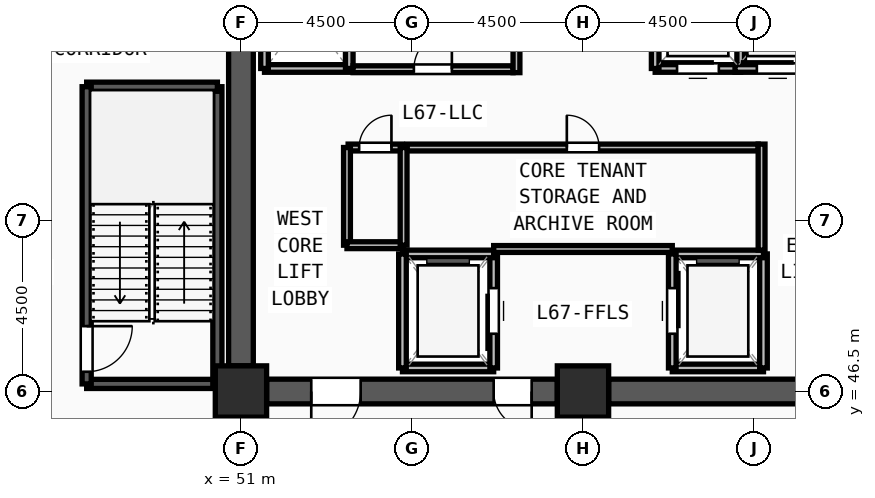
"""IFC4 building model, lengths in metres.
Left out: names, types, materials, properties, quantities, classifications, styles, units other than length and angle.
Written with IfcOpenShell. Run it as: python <this file> out.ifc"""

import sys

from ifc_helpers import new_model, si_unit, direction, frame, frame_2d, origin, origin_2d, place, context, subcontext, project, spatial, rectangle, extrude, source, transform, mapped, element, fill, save


model = new_model("IFC4")
c1 = context("Model", 3, precision=1e-05, world=origin(), true_north=direction((0.0, 1.0)))
c2 = subcontext(c1, "Body", "Model", "MODEL_VIEW")
j1 = project(units=[si_unit("LENGTHUNIT", "METRE"), si_unit("PLANEANGLEUNIT", "RADIAN")], contexts=[c1])
p1 = place(None, origin())
s1 = spatial("IfcSite", under=j1, at=p1, CompositionType="ELEMENT")
p2 = place(p1, origin())
s2 = spatial("IfcBuilding", under=s1, at=p2, CompositionType="ELEMENT")
p3 = place(p2, frame((0.0, 0.0, 258.75)))
s3 = spatial("IfcBuildingStorey", under=s2, at=p3, CompositionType="ELEMENT", Elevation=258.75)
m1 = source(origin(), c2, "Body", "SweptSolid", [
    extrude(rectangle(XDim=1.35, YDim=1.35, at=origin_2d()), origin(), (0.0, 0.0, 1.0), 3.75),
])
for number, where, z_axis, x_axis in (
    (1, (51.0, 46.5, 0.0), (0.0, 0.0, 1.0), (1.0, 0.0, 0.0)),
    (2, (60.0, 46.5, 0.0), (0.0, 0.0, 1.0), (1.0, 0.0, 0.0)),
):
    element("IfcColumn", number, at=place(p3, frame(where, z_axis=z_axis, x_axis=x_axis)), inside=s3, PredefinedType="COLUMN", context=c2, shape_type="MappedRepresentation", body=[
        mapped(m1, transform((0.0, 0.0, 0.0), x_axis=(1.0, 0.0, 0.0), y_axis=(0.0, 1.0, 0.0), z_axis=(0.0, 0.0, 1.0), scale=1.0)),
    ])
p4 = place(p3, frame((68.325, 46.5, 0.0), z_axis=(0.0, 0.0, 1.0), x_axis=(-1.0, 0.0, 0.0)))
e3 = element("IfcWall", 3, at=p4, inside=s3, PredefinedType="SHEAR", context=c2, shape_type="SweptSolid", body=[
    extrude(rectangle(XDim=7.65, YDim=0.65, at=frame_2d((3.825, 0.0))), origin(), (0.0, 0.0, 1.0), 3.57),
])
m2 = source(origin(), c2, "Body", "SweptSolid", [
    extrude(rectangle(XDim=1.3, YDim=2.2, at=frame_2d((0.65, 1.1))), frame((0.0, 0.335, 0.0), z_axis=(0.0, -1.0, 0.0), x_axis=(1.0, 0.0, 0.0)), (0.0, 0.0, 1.0), 0.67),
])
p5 = place(p4, frame((1.175, 0.0, 0.0)))
e4 = element("IfcOpeningElement", 4, at=p5, cuts=e3, PredefinedType="OPENING", context=c2, shape_type="MappedRepresentation", body=[
    mapped(m2, transform((0.0, 0.0, 0.0), x_axis=(1.0, 0.0, 0.0), y_axis=(0.0, 1.0, 0.0), z_axis=(0.0, 0.0, 1.0), scale=1.0)),
])
p6 = place(p3, frame((59.325, 46.5, 0.0), z_axis=(0.0, 0.0, 1.0), x_axis=(-1.0, 0.0, 0.0)))
e5 = element("IfcWall", 5, at=p6, inside=s3, PredefinedType="SHEAR", context=c2, shape_type="SweptSolid", body=[
    extrude(rectangle(XDim=7.65, YDim=0.65, at=frame_2d((3.825, 0.0))), origin(), (0.0, 0.0, 1.0), 3.57),
])
p7 = place(p6, frame((5.175, 0.0, 0.0)))
e6 = element("IfcOpeningElement", 6, at=p7, cuts=e5, PredefinedType="OPENING", context=c2, shape_type="MappedRepresentation", body=[
    mapped(m2, transform((0.0, 0.0, 0.0), x_axis=(1.0, 0.0, 0.0), y_axis=(0.0, 1.0, 0.0), z_axis=(0.0, 0.0, 1.0), scale=1.0)),
])
m3 = source(origin(), c2, "Body", "SweptSolid", [
    extrude(rectangle(XDim=1.0, YDim=2.2, at=frame_2d((0.5, 1.1))), frame((0.0, 0.335, 0.0), z_axis=(0.0, -1.0, 0.0), x_axis=(1.0, 0.0, 0.0)), (0.0, 0.0, 1.0), 0.67),
])
p8 = place(p6, frame((0.675, 0.0, 0.0)))
e7 = element("IfcOpeningElement", 7, at=p8, cuts=e5, PredefinedType="OPENING", context=c2, shape_type="MappedRepresentation", body=[
    mapped(m3, transform((0.0, 0.0, 0.0), x_axis=(1.0, 0.0, 0.0), y_axis=(0.0, 1.0, 0.0), z_axis=(0.0, 0.0, 1.0), scale=1.0)),
])
p9 = place(p3, frame((51.0, 47.175, 0.0), z_axis=(0.0, 0.0, 1.0), x_axis=(0.0, 1.0, 0.0)))
e8 = element("IfcWall", 8, at=p9, inside=s3, PredefinedType="SHEAR", context=c2, shape_type="SweptSolid", body=[
    extrude(rectangle(XDim=13.65, YDim=0.65, at=frame_2d((6.825, 0.0))), origin(), (0.0, 0.0, 1.0), 3.57),
])
p10 = place(p3, frame((46.94, 46.7, 0.0), z_axis=(0.0, 0.0, 1.0), x_axis=(1.0, 0.0, 0.0)))
e9 = element("IfcWall", 9, at=p10, inside=s3, PredefinedType="SOLIDWALL", context=c2, shape_type="SweptSolid", body=[
    extrude(rectangle(XDim=3.44, YDim=0.24, at=frame_2d((1.72, 0.0))), origin(), (0.0, 0.0, 1.0), 3.57),
])
p11 = place(p3, frame((50.38, 46.7, 0.0), z_axis=(0.0, 0.0, 1.0), x_axis=(0.0, 1.0, 0.0)))
e10 = element("IfcWall", 10, at=p11, inside=s3, PredefinedType="SOLIDWALL", context=c2, shape_type="SweptSolid", body=[
    extrude(rectangle(XDim=7.82, YDim=0.24, at=frame_2d((3.91, 0.0))), origin(), (0.0, 0.0, 1.0), 3.57),
])
p12 = place(p3, frame((50.38, 54.52, 0.0), z_axis=(0.0, 0.0, 1.0), x_axis=(-1.0, 0.0, 0.0)))
e11 = element("IfcWall", 11, at=p12, inside=s3, PredefinedType="SOLIDWALL", context=c2, shape_type="SweptSolid", body=[
    extrude(rectangle(XDim=3.44, YDim=0.24, at=frame_2d((1.72, 0.0))), origin(), (0.0, 0.0, 1.0), 3.57),
])
p13 = place(p3, frame((46.94, 54.52, 0.0), z_axis=(0.0, 0.0, 1.0), x_axis=(0.0, -1.0, 0.0)))
e12 = element("IfcWall", 12, at=p13, inside=s3, PredefinedType="SOLIDWALL", context=c2, shape_type="SweptSolid", body=[
    extrude(rectangle(XDim=7.82, YDim=0.24, at=frame_2d((3.91, 0.0))), origin(), (0.0, 0.0, 1.0), 3.57),
])
m4 = source(origin(), c2, "Body", "SweptSolid", [
    extrude(rectangle(XDim=1.2, YDim=2.2, at=frame_2d((0.6, 1.1))), frame((0.0, 0.13, 0.0), z_axis=(0.0, -1.0, 0.0), x_axis=(1.0, 0.0, 0.0)), (0.0, 0.0, 1.0), 0.26),
])
p14 = place(p13, frame((6.3, 0.0, 0.0)))
e13 = element("IfcOpeningElement", 13, at=p14, cuts=e12, PredefinedType="OPENING", context=c2, shape_type="MappedRepresentation", body=[
    mapped(m4, transform((0.0, 0.0, 0.0), x_axis=(1.0, 0.0, 0.0), y_axis=(0.0, 1.0, 0.0), z_axis=(0.0, 0.0, 1.0), scale=1.0)),
])
p15 = place(p3, frame((55.25, 47.12, 0.0), z_axis=(0.0, 0.0, 1.0), x_axis=(1.0, 0.0, 0.0)))
e14 = element("IfcWall", 14, at=p15, inside=s3, PredefinedType="SOLIDWALL", context=c2, shape_type="SweptSolid", body=[
    extrude(rectangle(XDim=2.4, YDim=0.2, at=frame_2d((1.2, 0.0))), origin(), (0.0, 0.0, 1.0), 3.57),
])
p16 = place(p3, frame((57.65, 47.12, 0.0), z_axis=(0.0, 0.0, 1.0), x_axis=(0.0, 1.0, 0.0)))
e15 = element("IfcWall", 15, at=p16, inside=s3, PredefinedType="SOLIDWALL", context=c2, shape_type="SweptSolid", body=[
    extrude(rectangle(XDim=3.0, YDim=0.2, at=frame_2d((1.5, 0.0))), origin(), (0.0, 0.0, 1.0), 3.57),
])
m5 = source(origin(), c2, "Body", "SweptSolid", [
    extrude(rectangle(XDim=1.2, YDim=2.3, at=frame_2d((0.6, 1.15))), frame((0.0, 0.11, 0.0), z_axis=(0.0, -1.0, 0.0), x_axis=(1.0, 0.0, 0.0)), (0.0, 0.0, 1.0), 0.22),
])
p17 = place(p16, frame((0.9, 0.0, 0.0)))
e16 = element("IfcOpeningElement", 16, at=p17, cuts=e15, PredefinedType="OPENING", context=c2, shape_type="MappedRepresentation", body=[
    mapped(m5, transform((0.0, 0.0, 0.0), x_axis=(1.0, 0.0, 0.0), y_axis=(0.0, 1.0, 0.0), z_axis=(0.0, 0.0, 1.0), scale=1.0)),
])
p18 = place(p3, frame((57.65, 50.12, 0.0), z_axis=(0.0, 0.0, 1.0), x_axis=(-1.0, 0.0, 0.0)))
e17 = element("IfcWall", 17, at=p18, inside=s3, PredefinedType="SOLIDWALL", context=c2, shape_type="SweptSolid", body=[
    extrude(rectangle(XDim=2.4, YDim=0.2, at=frame_2d((1.2, 0.0))), origin(), (0.0, 0.0, 1.0), 3.57),
])
p19 = place(p3, frame((55.25, 50.12, 0.0), z_axis=(0.0, 0.0, 1.0), x_axis=(0.0, -1.0, 0.0)))
e18 = element("IfcWall", 18, at=p19, inside=s3, PredefinedType="SOLIDWALL", context=c2, shape_type="SweptSolid", body=[
    extrude(rectangle(XDim=3.0, YDim=0.2, at=frame_2d((1.5, 0.0))), origin(), (0.0, 0.0, 1.0), 3.57),
])
p20 = place(p3, frame((62.35, 47.12, 0.0), z_axis=(0.0, 0.0, 1.0), x_axis=(1.0, 0.0, 0.0)))
e19 = element("IfcWall", 19, at=p20, inside=s3, PredefinedType="SOLIDWALL", context=c2, shape_type="SweptSolid", body=[
    extrude(rectangle(XDim=2.4, YDim=0.2, at=frame_2d((1.2, 0.0))), origin(), (0.0, 0.0, 1.0), 3.57),
])
p21 = place(p3, frame((64.75, 47.12, 0.0), z_axis=(0.0, 0.0, 1.0), x_axis=(0.0, 1.0, 0.0)))
e20 = element("IfcWall", 20, at=p21, inside=s3, PredefinedType="SOLIDWALL", context=c2, shape_type="SweptSolid", body=[
    extrude(rectangle(XDim=3.0, YDim=0.2, at=frame_2d((1.5, 0.0))), origin(), (0.0, 0.0, 1.0), 3.57),
])
p22 = place(p3, frame((64.75, 50.12, 0.0), z_axis=(0.0, 0.0, 1.0), x_axis=(-1.0, 0.0, 0.0)))
e21 = element("IfcWall", 21, at=p22, inside=s3, PredefinedType="SOLIDWALL", context=c2, shape_type="SweptSolid", body=[
    extrude(rectangle(XDim=2.4, YDim=0.2, at=frame_2d((1.2, 0.0))), origin(), (0.0, 0.0, 1.0), 3.57),
])
p23 = place(p3, frame((62.35, 50.12, 0.0), z_axis=(0.0, 0.0, 1.0), x_axis=(0.0, -1.0, 0.0)))
e22 = element("IfcWall", 22, at=p23, inside=s3, PredefinedType="SOLIDWALL", context=c2, shape_type="SweptSolid", body=[
    extrude(rectangle(XDim=3.0, YDim=0.2, at=frame_2d((1.5, 0.0))), origin(), (0.0, 0.0, 1.0), 3.57),
])
p24 = place(p23, frame((0.9, 0.0, 0.0)))
e23 = element("IfcOpeningElement", 23, at=p24, cuts=e22, PredefinedType="OPENING", context=c2, shape_type="MappedRepresentation", body=[
    mapped(m5, transform((0.0, 0.0, 0.0), x_axis=(1.0, 0.0, 0.0), y_axis=(0.0, 1.0, 0.0), z_axis=(0.0, 0.0, 1.0), scale=1.0)),
])
p25 = place(p3, frame((51.62, 55.0, 0.0), z_axis=(0.0, 0.0, 1.0), x_axis=(1.0, 0.0, 0.0)))
e24 = element("IfcWall", 24, at=p25, inside=s3, PredefinedType="SOLIDWALL", context=c2, shape_type="SweptSolid", body=[
    extrude(rectangle(XDim=2.23, YDim=0.2, at=frame_2d((1.115, 0.0))), origin(), (0.0, 0.0, 1.0), 3.57),
])
for number, where, z_axis, x_axis in (
    (25, (53.85, 55.0, 0.0), (0.0, 0.0, 1.0), (0.0, 1.0, 0.0)),
    (26, (51.62, 58.0, 0.0), (0.0, 0.0, 1.0), (0.0, -1.0, 0.0)),
):
    element("IfcWall", number, at=place(p3, frame(where, z_axis=z_axis, x_axis=x_axis)), inside=s3, PredefinedType="SOLIDWALL", context=c2, shape_type="SweptSolid", body=[
        extrude(rectangle(XDim=3.0, YDim=0.2, at=frame_2d((1.5, 0.0))), origin(), (0.0, 0.0, 1.0), 3.57),
    ])
p26 = place(p3, frame((61.9, 55.0, 0.0), z_axis=(0.0, 0.0, 1.0), x_axis=(1.0, 0.0, 0.0)))
e27 = element("IfcWall", 27, at=p26, inside=s3, PredefinedType="SOLIDWALL", context=c2, shape_type="SweptSolid", body=[
    extrude(rectangle(XDim=2.25, YDim=0.2, at=frame_2d((1.125, 0.0))), origin(), (0.0, 0.0, 1.0), 3.57),
])
m6 = source(origin(), c2, "Body", "SweptSolid", [
    extrude(rectangle(XDim=1.1, YDim=2.2, at=frame_2d((0.55, 1.1))), frame((0.0, 0.11, 0.0), z_axis=(0.0, -1.0, 0.0), x_axis=(1.0, 0.0, 0.0)), (0.0, 0.0, 1.0), 0.22),
])
p27 = place(p26, frame((0.575, 0.0, 0.0)))
e28 = element("IfcOpeningElement", 28, at=p27, cuts=e27, PredefinedType="OPENING", context=c2, shape_type="MappedRepresentation", body=[
    mapped(m6, transform((0.0, 0.0, 0.0), x_axis=(1.0, 0.0, 0.0), y_axis=(0.0, 1.0, 0.0), z_axis=(0.0, 0.0, 1.0), scale=1.0)),
])
for number, where, z_axis, x_axis in (
    (29, (64.15, 55.0, 0.0), (0.0, 0.0, 1.0), (0.0, 1.0, 0.0)),
    (30, (61.9, 57.6, 0.0), (0.0, 0.0, 1.0), (0.0, -1.0, 0.0)),
):
    element("IfcWall", number, at=place(p3, frame(where, z_axis=z_axis, x_axis=x_axis)), inside=s3, PredefinedType="SOLIDWALL", context=c2, shape_type="SweptSolid", body=[
        extrude(rectangle(XDim=2.6, YDim=0.2, at=frame_2d((1.3, 0.0))), origin(), (0.0, 0.0, 1.0), 3.57),
    ])
p28 = place(p3, frame((64.0, 55.0, 0.0), z_axis=(0.0, 0.0, 1.0), x_axis=(1.0, 0.0, 0.0)))
e31 = element("IfcWall", 31, at=p28, inside=s3, PredefinedType="SOLIDWALL", context=c2, shape_type="SweptSolid", body=[
    extrude(rectangle(XDim=2.25, YDim=0.2, at=frame_2d((1.125, 0.0))), origin(), (0.0, 0.0, 1.0), 3.57),
])
p29 = place(p28, frame((0.575, 0.0, 0.0)))
e32 = element("IfcOpeningElement", 32, at=p29, cuts=e31, PredefinedType="OPENING", context=c2, shape_type="MappedRepresentation", body=[
    mapped(m6, transform((0.0, 0.0, 0.0), x_axis=(1.0, 0.0, 0.0), y_axis=(0.0, 1.0, 0.0), z_axis=(0.0, 0.0, 1.0), scale=1.0)),
])
p30 = place(p3, frame((55.37, 52.92, 0.0), z_axis=(0.0, 0.0, 1.0), x_axis=(1.0, 0.0, 0.0)))
e33 = element("IfcWall", 33, at=p30, inside=s3, PredefinedType="PARTITIONING", context=c2, shape_type="SweptSolid", body=[
    extrude(rectangle(XDim=9.24, YDim=0.18, at=frame_2d((4.62, 0.0))), origin(), (0.0, 0.0, 1.0), 3.57),
])
m7 = source(origin(), c2, "Body", "SweptSolid", [
    extrude(rectangle(XDim=0.85, YDim=2.1, at=frame_2d((0.425, 1.05))), frame((0.0, 0.1, 0.0), z_axis=(0.0, -1.0, 0.0), x_axis=(1.0, 0.0, 0.0)), (0.0, 0.0, 1.0), 0.2),
])
p31 = place(p30, frame((4.205, 0.0, 0.0)))
e34 = element("IfcOpeningElement", 34, at=p31, cuts=e33, PredefinedType="OPENING", context=c2, shape_type="MappedRepresentation", body=[
    mapped(m7, transform((0.0, 0.0, 0.0), x_axis=(1.0, 0.0, 0.0), y_axis=(0.0, 1.0, 0.0), z_axis=(0.0, 0.0, 1.0), scale=1.0)),
])
p32 = place(p3, frame((53.95, 54.98, 0.0), z_axis=(0.0, 0.0, 1.0), x_axis=(1.0, 0.0, 0.0)))
e35 = element("IfcWall", 35, at=p32, inside=s3, PredefinedType="PARTITIONING", context=c2, shape_type="SweptSolid", body=[
    extrude(rectangle(XDim=4.21, YDim=0.18, at=frame_2d((2.105, 0.0))), origin(), (0.0, 0.0, 1.0), 3.57),
])
m8 = source(origin(), c2, "Body", "SweptSolid", [
    extrude(rectangle(XDim=1.0, YDim=2.2, at=frame_2d((0.5, 1.1))), frame((0.0, 0.1, 0.0), z_axis=(0.0, -1.0, 0.0), x_axis=(1.0, 0.0, 0.0)), (0.0, 0.0, 1.0), 0.2),
])
p33 = place(p32, frame((1.6, 0.0, 0.0)))
e36 = element("IfcOpeningElement", 36, at=p33, cuts=e35, PredefinedType="OPENING", context=c2, shape_type="MappedRepresentation", body=[
    mapped(m8, transform((0.0, 0.0, 0.0), x_axis=(1.0, 0.0, 0.0), y_axis=(0.0, 1.0, 0.0), z_axis=(0.0, 0.0, 1.0), scale=1.0)),
])
p34 = place(p3, frame((53.82, 52.92, 0.0), z_axis=(0.0, 0.0, 1.0), x_axis=(1.0, 0.0, 0.0)))
e37 = element("IfcWall", 37, at=p34, inside=s3, PredefinedType="PARTITIONING", context=c2, shape_type="SweptSolid", body=[
    extrude(rectangle(XDim=1.43, YDim=0.18, at=frame_2d((0.715, 0.0))), origin(), (0.0, 0.0, 1.0), 3.57),
])
p35 = place(p34, frame((0.29, 0.0, 0.0)))
e38 = element("IfcOpeningElement", 38, at=p35, cuts=e37, PredefinedType="OPENING", context=c2, shape_type="MappedRepresentation", body=[
    mapped(m7, transform((0.0, 0.0, 0.0), x_axis=(1.0, 0.0, 0.0), y_axis=(0.0, 1.0, 0.0), z_axis=(0.0, 0.0, 1.0), scale=1.0)),
])
p36 = place(p3, frame((53.79, 50.35, 0.0), z_axis=(0.0, 0.0, 1.0), x_axis=(0.0, 1.0, 0.0)))
e39 = element("IfcWall", 39, at=p36, inside=s3, PredefinedType="PARTITIONING", context=c2, shape_type="SweptSolid", body=[
    extrude(rectangle(XDim=2.57, YDim=0.18, at=frame_2d((1.285, 0.0))), origin(), (0.0, 0.0, 1.0), 3.57),
])
p37 = place(p3, frame((53.79, 50.35, 0.0), z_axis=(0.0, 0.0, 1.0), x_axis=(1.0, 0.0, 0.0)))
e40 = element("IfcWall", 40, at=p37, inside=s3, PredefinedType="PARTITIONING", context=c2, shape_type="SweptSolid", body=[
    extrude(rectangle(XDim=1.49, YDim=0.18, at=frame_2d((0.745, 0.0))), origin(), (0.0, 0.0, 1.0), 3.57),
])
p38 = place(p3, frame((55.28, 50.35, 0.0), z_axis=(0.0, 0.0, 1.0), x_axis=(0.0, 1.0, 0.0)))
e41 = element("IfcWall", 41, at=p38, inside=s3, PredefinedType="PARTITIONING", context=c2, shape_type="SweptSolid", body=[
    extrude(rectangle(XDim=2.57, YDim=0.18, at=frame_2d((1.285, 0.0))), origin(), (0.0, 0.0, 1.0), 3.57),
])
p39 = place(p3, frame((64.7, 50.22, 0.0), z_axis=(0.0, 0.0, 1.0), x_axis=(0.0, 1.0, 0.0)))
e42 = element("IfcWall", 42, at=p39, inside=s3, PredefinedType="PARTITIONING", context=c2, shape_type="SweptSolid", body=[
    extrude(rectangle(XDim=2.79, YDim=0.18, at=frame_2d((1.395, 0.0))), origin(), (0.0, 0.0, 1.0), 3.57),
])
p40 = place(p3, frame((57.65, 50.25, 0.0), z_axis=(0.0, 0.0, 1.0), x_axis=(1.0, 0.0, 0.0)))
e43 = element("IfcWall", 43, at=p40, inside=s3, PredefinedType="PARTITIONING", context=c2, shape_type="SweptSolid", body=[
    extrude(rectangle(XDim=4.7, YDim=0.18, at=frame_2d((2.35, 0.0))), origin(), (0.0, 0.0, 1.0), 3.57),
])
p41 = place(p3, frame((58.25, 54.89, 0.0), z_axis=(0.0, 0.0, 1.0), x_axis=(0.0, 1.0, 0.0)))
e44 = element("IfcWall", 44, at=p41, inside=s3, PredefinedType="PARTITIONING", context=c2, shape_type="SweptSolid", body=[
    extrude(rectangle(XDim=2.78, YDim=0.18, at=frame_2d((1.39, 0.0))), origin(), (0.0, 0.0, 1.0), 3.57),
])
m9 = source(origin(), c2, "Body", "SweptSolid", [
    extrude(rectangle(XDim=1.3, YDim=2.2, at=frame_2d((0.65, 1.1))), frame((0.0, 0.025, 0.0), z_axis=(0.0, -1.0, 0.0), x_axis=(1.0, 0.0, 0.0)), (0.0, 0.0, 1.0), 0.05),
])
p42 = place(p7, origin())
e45 = element("IfcDoor", 45, at=p42, inside=s3, OperationType="SINGLE_SWING_RIGHT", PredefinedType="DOOR", context=c2, shape_type="MappedRepresentation", body=[
    mapped(m9, transform((0.0, 0.0, 0.0), x_axis=(1.0, 0.0, 0.0), y_axis=(0.0, 1.0, 0.0), z_axis=(0.0, 0.0, 1.0), scale=1.0)),
])
fill(e6, e45)
m10 = source(origin(), c2, "Body", "SweptSolid", [
    extrude(rectangle(XDim=1.0, YDim=2.2, at=frame_2d((0.5, 1.1))), frame((0.0, 0.025, 0.0), z_axis=(0.0, -1.0, 0.0), x_axis=(1.0, 0.0, 0.0)), (0.0, 0.0, 1.0), 0.05),
])
p43 = place(p8, origin())
e46 = element("IfcDoor", 46, at=p43, inside=s3, OperationType="SINGLE_SWING_LEFT", PredefinedType="DOOR", context=c2, shape_type="MappedRepresentation", body=[
    mapped(m10, transform((0.0, 0.0, 0.0), x_axis=(1.0, 0.0, 0.0), y_axis=(0.0, 1.0, 0.0), z_axis=(0.0, 0.0, 1.0), scale=1.0)),
])
fill(e7, e46)
m11 = source(origin(), c2, "Body", "SweptSolid", [
    extrude(rectangle(XDim=1.2, YDim=2.2, at=frame_2d((0.6, 1.1))), frame((0.0, 0.025, 0.0), z_axis=(0.0, -1.0, 0.0), x_axis=(1.0, 0.0, 0.0)), (0.0, 0.0, 1.0), 0.05),
])
p44 = place(p14, origin())
e47 = element("IfcDoor", 47, at=p44, inside=s3, OperationType="SINGLE_SWING_LEFT", PredefinedType="DOOR", context=c2, shape_type="MappedRepresentation", body=[
    mapped(m11, transform((0.0, 0.0, 0.0), x_axis=(1.0, 0.0, 0.0), y_axis=(0.0, 1.0, 0.0), z_axis=(0.0, 0.0, 1.0), scale=1.0)),
])
fill(e13, e47)
m12 = source(origin(), c2, "Body", "SweptSolid", [
    extrude(rectangle(XDim=1.2, YDim=2.3, at=frame_2d((0.6, 1.15))), frame((0.0, 0.025, 0.0), z_axis=(0.0, -1.0, 0.0), x_axis=(1.0, 0.0, 0.0)), (0.0, 0.0, 1.0), 0.05),
])
p45 = place(p17, origin())
e48 = element("IfcDoor", 48, at=p45, inside=s3, OperationType="SLIDING_TO_LEFT", PredefinedType="DOOR", context=c2, shape_type="MappedRepresentation", body=[
    mapped(m12, transform((0.0, 0.0, 0.0), x_axis=(1.0, 0.0, 0.0), y_axis=(0.0, 1.0, 0.0), z_axis=(0.0, 0.0, 1.0), scale=1.0)),
])
fill(e16, e48)
p46 = place(p24, origin())
e49 = element("IfcDoor", 49, at=p46, inside=s3, OperationType="SLIDING_TO_LEFT", PredefinedType="DOOR", context=c2, shape_type="MappedRepresentation", body=[
    mapped(m12, transform((0.0, 0.0, 0.0), x_axis=(1.0, 0.0, 0.0), y_axis=(0.0, 1.0, 0.0), z_axis=(0.0, 0.0, 1.0), scale=1.0)),
])
fill(e23, e49)
m13 = source(origin(), c2, "Body", "SweptSolid", [
    extrude(rectangle(XDim=1.1, YDim=2.2, at=frame_2d((0.55, 1.1))), frame((0.0, 0.025, 0.0), z_axis=(0.0, -1.0, 0.0), x_axis=(1.0, 0.0, 0.0)), (0.0, 0.0, 1.0), 0.05),
])
p47 = place(p27, origin())
e50 = element("IfcDoor", 50, at=p47, inside=s3, OperationType="SLIDING_TO_LEFT", PredefinedType="DOOR", context=c2, shape_type="MappedRepresentation", body=[
    mapped(m13, transform((0.0, 0.0, 0.0), x_axis=(1.0, 0.0, 0.0), y_axis=(0.0, 1.0, 0.0), z_axis=(0.0, 0.0, 1.0), scale=1.0)),
])
fill(e28, e50)
p48 = place(p29, origin())
e51 = element("IfcDoor", 51, at=p48, inside=s3, OperationType="SLIDING_TO_LEFT", PredefinedType="DOOR", context=c2, shape_type="MappedRepresentation", body=[
    mapped(m13, transform((0.0, 0.0, 0.0), x_axis=(1.0, 0.0, 0.0), y_axis=(0.0, 1.0, 0.0), z_axis=(0.0, 0.0, 1.0), scale=1.0)),
])
fill(e32, e51)
m14 = source(origin(), c2, "Body", "SweptSolid", [
    extrude(rectangle(XDim=0.85, YDim=2.1, at=frame_2d((0.425, 1.05))), frame((0.0, 0.025, 0.0), z_axis=(0.0, -1.0, 0.0), x_axis=(1.0, 0.0, 0.0)), (0.0, 0.0, 1.0), 0.05),
])
p49 = place(p31, origin())
e52 = element("IfcDoor", 52, at=p49, inside=s3, OperationType="SINGLE_SWING_LEFT", PredefinedType="DOOR", context=c2, shape_type="MappedRepresentation", body=[
    mapped(m14, transform((0.0, 0.0, 0.0), x_axis=(1.0, 0.0, 0.0), y_axis=(0.0, 1.0, 0.0), z_axis=(0.0, 0.0, 1.0), scale=1.0)),
])
fill(e34, e52)
p50 = place(p33, origin())
e53 = element("IfcDoor", 53, at=p50, inside=s3, OperationType="SINGLE_SWING_RIGHT", PredefinedType="DOOR", context=c2, shape_type="MappedRepresentation", body=[
    mapped(m10, transform((0.0, 0.0, 0.0), x_axis=(1.0, 0.0, 0.0), y_axis=(0.0, 1.0, 0.0), z_axis=(0.0, 0.0, 1.0), scale=1.0)),
])
fill(e36, e53)
p51 = place(p35, origin())
e54 = element("IfcDoor", 54, at=p51, inside=s3, OperationType="SINGLE_SWING_RIGHT", PredefinedType="DOOR", context=c2, shape_type="MappedRepresentation", body=[
    mapped(m14, transform((0.0, 0.0, 0.0), x_axis=(1.0, 0.0, 0.0), y_axis=(0.0, 1.0, 0.0), z_axis=(0.0, 0.0, 1.0), scale=1.0)),
])
fill(e38, e54)
save(model, sys.argv[1])
